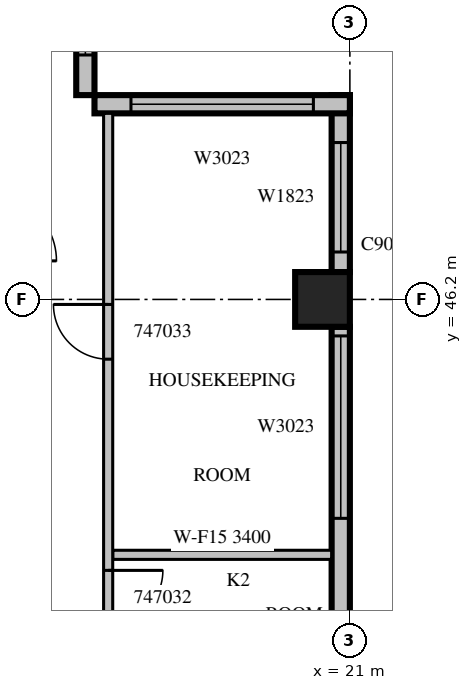
"""IFC4 building model, lengths in metres.
Left out: names, types, materials, properties, quantities, classifications, styles, units other than length and angle.
Written with IfcOpenShell. Run it as: python <this file> out.ifc"""

import sys

from ifc_helpers import new_model, si_unit, direction, frame, frame_2d, origin, origin_2d, place, context, subcontext, project, spatial, rectangle, extrude, source, transform, mapped, element, fill, save


model = new_model("IFC4")
c1 = context("Model", 3, precision=1e-05, world=origin(), true_north=direction((0.0, 1.0)))
c2 = subcontext(c1, "Body", "Model", "MODEL_VIEW")
j1 = project(units=[si_unit("LENGTHUNIT", "METRE"), si_unit("PLANEANGLEUNIT", "RADIAN")], contexts=[c1])
p1 = place(None, origin())
s1 = spatial("IfcSite", under=j1, at=p1, CompositionType="ELEMENT")
p2 = place(p1, origin())
s2 = spatial("IfcBuilding", under=s1, at=p2, CompositionType="ELEMENT")
p3 = place(p2, frame((0.0, 0.0, 212.0)))
s3 = spatial("IfcBuildingStorey", under=s2, at=p3, CompositionType="ELEMENT", Elevation=212.0)
m1 = source(origin(), c2, "Body", "SweptSolid", [
    extrude(rectangle(XDim=0.9, YDim=0.9, at=origin_2d()), origin(), (0.0, 0.0, 1.0), 3.8),
])
p4 = place(p3, frame((20.55, 46.2, 0.0), z_axis=(0.0, 0.0, 1.0), x_axis=(1.0, 0.0, 0.0)))
e1 = element("IfcColumn", 1, at=p4, inside=s3, PredefinedType="COLUMN", context=c2, shape_type="MappedRepresentation", body=[
    mapped(m1, transform((0.0, 0.0, 0.0), scale=1.0)),
])
m2 = source(origin(), c2, "Body", "SweptSolid", [
    extrude(rectangle(XDim=7.5, YDim=0.3, at=frame_2d((3.75, 0.0))), origin(), (0.0, 0.0, 1.0), 3.4),
])
p5 = place(p3, frame((20.85, 38.25, 0.0), z_axis=(0.0, 0.0, 1.0), x_axis=(0.0, 1.0, 0.0)))
e2 = element("IfcWall", 2, at=p5, inside=s3, PredefinedType="STANDARD", context=c2, shape_type="MappedRepresentation", body=[
    mapped(m2, transform((0.0, 0.0, 0.0), scale=1.0)),
])
m3 = source(origin(), c2, "Body", "SweptSolid", [
    extrude(rectangle(XDim=1.2, YDim=2.3, at=frame_2d((0.6, 1.15))), frame((0.0, 0.16, 0.0), z_axis=(0.0, -1.0, 0.0), x_axis=(1.0, 0.0, 0.0)), (0.0, 0.0, 1.0), 0.32),
])
p6 = place(p5, frame((0.557, 0.0, 0.6)))
e3 = element("IfcOpeningElement", 3, at=p6, cuts=e2, PredefinedType="OPENING", context=c2, shape_type="MappedRepresentation", body=[
    mapped(m3, transform((0.0, 0.0, 0.0), scale=1.0)),
])
m4 = source(origin(), c2, "Body", "SweptSolid", [
    extrude(rectangle(XDim=3.0, YDim=2.3, at=frame_2d((1.5, 1.15))), frame((0.0, 0.16, 0.0), z_axis=(0.0, -1.0, 0.0), x_axis=(1.0, 0.0, 0.0)), (0.0, 0.0, 1.0), 0.32),
])
p7 = place(p5, frame((4.35, 0.0, 0.6)))
e4 = element("IfcOpeningElement", 4, at=p7, cuts=e2, PredefinedType="OPENING", context=c2, shape_type="MappedRepresentation", body=[
    mapped(m4, transform((0.0, 0.0, 0.0), scale=1.0)),
])
m5 = source(origin(), c2, "Body", "SweptSolid", [
    extrude(rectangle(XDim=2.91, YDim=0.3, at=frame_2d((1.455, 0.0))), origin(), (0.0, 0.0, 1.0), 3.4),
])
p8 = place(p3, frame((20.85, 46.65, 0.0), z_axis=(0.0, 0.0, 1.0), x_axis=(0.0, 1.0, 0.0)))
e5 = element("IfcWall", 5, at=p8, inside=s3, PredefinedType="STANDARD", context=c2, shape_type="MappedRepresentation", body=[
    mapped(m5, transform((0.0, 0.0, 0.0), scale=1.0)),
])
m6 = source(origin(), c2, "Body", "SweptSolid", [
    extrude(rectangle(XDim=1.8, YDim=2.3, at=frame_2d((0.9, 1.15))), frame((0.0, 0.16, 0.0), z_axis=(0.0, -1.0, 0.0), x_axis=(1.0, 0.0, 0.0)), (0.0, 0.0, 1.0), 0.32),
])
p9 = place(p8, frame((0.33, 0.0, 0.6)))
e6 = element("IfcOpeningElement", 6, at=p9, cuts=e5, PredefinedType="OPENING", context=c2, shape_type="MappedRepresentation", body=[
    mapped(m6, transform((0.0, 0.0, 0.0), scale=1.0)),
])
m7 = source(origin(), c2, "Body", "SweptSolid", [
    extrude(rectangle(XDim=4.2, YDim=0.3, at=frame_2d((2.1, 0.0))), origin(), (0.0, 0.0, 1.0), 3.4),
])
p10 = place(p3, frame((21.0, 49.41, 0.0), z_axis=(0.0, 0.0, 1.0), x_axis=(-1.0, 0.0, 0.0)))
e7 = element("IfcWall", 7, at=p10, inside=s3, PredefinedType="STANDARD", context=c2, shape_type="MappedRepresentation", body=[
    mapped(m7, transform((0.0, 0.0, 0.0), scale=1.0)),
])
p11 = place(p10, frame((0.6, 0.0, 0.6)))
e8 = element("IfcOpeningElement", 8, at=p11, cuts=e7, PredefinedType="OPENING", context=c2, shape_type="MappedRepresentation", body=[
    mapped(m4, transform((0.0, 0.0, 0.0), scale=1.0)),
])
m8 = source(origin(), c2, "Body", "SweptSolid", [
    extrude(rectangle(XDim=2.52, YDim=0.3, at=frame_2d((1.26, 0.0))), origin(), (0.0, 0.0, 1.0), 3.4),
])
p12 = place(p3, frame((16.65, 49.56, 0.0), z_axis=(0.0, 0.0, 1.0), x_axis=(0.0, 1.0, 0.0)))
e9 = element("IfcWall", 9, at=p12, inside=s3, PredefinedType="STANDARD", context=c2, shape_type="MappedRepresentation", body=[
    mapped(m8, transform((0.0, 0.0, 0.0), scale=1.0)),
])
p13 = place(p12, frame((0.66, 0.0, 0.6)))
e10 = element("IfcOpeningElement", 10, at=p13, cuts=e9, PredefinedType="OPENING", context=c2, shape_type="MappedRepresentation", body=[
    mapped(m3, transform((0.0, 0.0, 0.0), scale=1.0)),
])
m9 = source(origin(), c2, "Body", "SweptSolid", [
    extrude(rectangle(XDim=3.6, YDim=0.15, at=frame_2d((1.8, 0.0))), origin(), (0.0, 0.0, 1.0), 3.4),
])
p14 = place(p3, frame((20.7, 42.0, 0.0), z_axis=(0.0, 0.0, 1.0), x_axis=(-1.0, 0.0, 0.0)))
e11 = element("IfcWall", 11, at=p14, inside=s3, PredefinedType="PARTITIONING", context=c2, shape_type="MappedRepresentation", body=[
    mapped(m9, transform((0.0, 0.0, 0.0), scale=1.0)),
])
m10 = source(origin(), c2, "Body", "SweptSolid", [
    extrude(rectangle(XDim=19.86, YDim=0.15, at=frame_2d((9.93, 0.0))), origin(), (0.0, 0.0, 1.0), 3.4),
])
p15 = place(p3, frame((17.025, 49.26, 0.0), z_axis=(0.0, 0.0, 1.0), x_axis=(0.0, -1.0, 0.0)))
e12 = element("IfcWall", 12, at=p15, inside=s3, PredefinedType="PARTITIONING", context=c2, shape_type="MappedRepresentation", body=[
    mapped(m10, transform((0.0, 0.0, 0.0), scale=1.0)),
])
m11 = source(origin(), c2, "Body", "SweptSolid", [
    extrude(rectangle(XDim=1.0, YDim=2.1, at=frame_2d((0.5, 1.05))), frame((0.0, 0.085, 0.0), z_axis=(0.0, -1.0, 0.0), x_axis=(1.0, 0.0, 0.0)), (0.0, 0.0, 1.0), 0.17),
])
p16 = place(p15, frame((16.598, 0.0, 0.0)))
e13 = element("IfcOpeningElement", 13, at=p16, cuts=e12, PredefinedType="OPENING", context=c2, shape_type="MappedRepresentation", body=[
    mapped(m11, transform((0.0, 0.0, 0.0), scale=1.0)),
])
p17 = place(p15, frame((9.566, 0.0, 0.0)))
e14 = element("IfcOpeningElement", 14, at=p17, cuts=e12, PredefinedType="OPENING", context=c2, shape_type="MappedRepresentation", body=[
    mapped(m11, transform((0.0, 0.0, 0.0), scale=1.0)),
])
m12 = source(origin(), c2, "Body", "SweptSolid", [
    extrude(rectangle(XDim=0.9, YDim=2.1, at=frame_2d((0.45, 1.05))), frame((0.0, 0.085, 0.0), z_axis=(0.0, -1.0, 0.0), x_axis=(1.0, 0.0, 0.0)), (0.0, 0.0, 1.0), 0.17),
])
p18 = place(p15, frame((7.516, 0.0, 0.0)))
e15 = element("IfcOpeningElement", 15, at=p18, cuts=e12, PredefinedType="OPENING", context=c2, shape_type="MappedRepresentation", body=[
    mapped(m12, transform((0.0, 0.0, 0.0), scale=1.0)),
])
p19 = place(p15, frame((3.143, 0.0, 0.0)))
e16 = element("IfcOpeningElement", 16, at=p19, cuts=e12, PredefinedType="OPENING", context=c2, shape_type="MappedRepresentation", body=[
    mapped(m12, transform((0.0, 0.0, 0.0), scale=1.0)),
])
m13 = source(origin(), c2, "Body", "SweptSolid", [
    extrude(rectangle(XDim=3.0, YDim=2.3, at=frame_2d((1.5, 1.15))), frame((0.0, 0.03, 0.0), z_axis=(0.0, -1.0, 0.0), x_axis=(1.0, 0.0, 0.0)), (0.0, 0.0, 1.0), 0.06),
])
p20 = place(p7, origin())
e17 = element("IfcWindow", 17, at=p20, inside=s3, PartitioningType="SINGLE_PANEL", PredefinedType="WINDOW", context=c2, shape_type="MappedRepresentation", body=[
    mapped(m13, transform((0.0, 0.0, 0.0), scale=1.0)),
])
fill(e4, e17)
m14 = source(origin(), c2, "Body", "SweptSolid", [
    extrude(rectangle(XDim=1.8, YDim=2.3, at=frame_2d((0.9, 1.15))), frame((0.0, 0.03, 0.0), z_axis=(0.0, -1.0, 0.0), x_axis=(1.0, 0.0, 0.0)), (0.0, 0.0, 1.0), 0.06),
])
p21 = place(p9, origin())
e18 = element("IfcWindow", 18, at=p21, inside=s3, PartitioningType="SINGLE_PANEL", PredefinedType="WINDOW", context=c2, shape_type="MappedRepresentation", body=[
    mapped(m14, transform((0.0, 0.0, 0.0), scale=1.0)),
])
fill(e6, e18)
p22 = place(p11, origin())
e19 = element("IfcWindow", 19, at=p22, inside=s3, PartitioningType="SINGLE_PANEL", PredefinedType="WINDOW", context=c2, shape_type="MappedRepresentation", body=[
    mapped(m13, transform((0.0, 0.0, 0.0), scale=1.0)),
])
fill(e8, e19)
m15 = source(origin(), c2, "Body", "SweptSolid", [
    extrude(rectangle(XDim=1.2, YDim=2.3, at=frame_2d((0.6, 1.15))), frame((0.0, 0.03, 0.0), z_axis=(0.0, -1.0, 0.0), x_axis=(1.0, 0.0, 0.0)), (0.0, 0.0, 1.0), 0.06),
])
p23 = place(p13, origin())
e20 = element("IfcWindow", 20, at=p23, inside=s3, PartitioningType="SINGLE_PANEL", PredefinedType="WINDOW", context=c2, shape_type="MappedRepresentation", body=[
    mapped(m15, transform((0.0, 0.0, 0.0), scale=1.0)),
])
fill(e10, e20)
m16 = source(origin(), c2, "Body", "SweptSolid", [
    extrude(rectangle(XDim=0.9, YDim=2.1, at=frame_2d((0.45, 1.05))), frame((0.0, 0.025, 0.0), z_axis=(0.0, -1.0, 0.0), x_axis=(1.0, 0.0, 0.0)), (0.0, 0.0, 1.0), 0.05),
])
p24 = place(p18, origin())
e21 = element("IfcDoor", 21, at=p24, inside=s3, OperationType="SINGLE_SWING_LEFT", PredefinedType="DOOR", context=c2, shape_type="MappedRepresentation", body=[
    mapped(m16, transform((0.0, 0.0, 0.0), scale=1.0)),
])
fill(e15, e21)
p25 = place(p19, origin())
e22 = element("IfcDoor", 22, at=p25, inside=s3, OperationType="SINGLE_SWING_RIGHT", PredefinedType="DOOR", context=c2, shape_type="MappedRepresentation", body=[
    mapped(m16, transform((0.0, 0.0, 0.0), scale=1.0)),
])
fill(e16, e22)
save(model, sys.argv[1])
